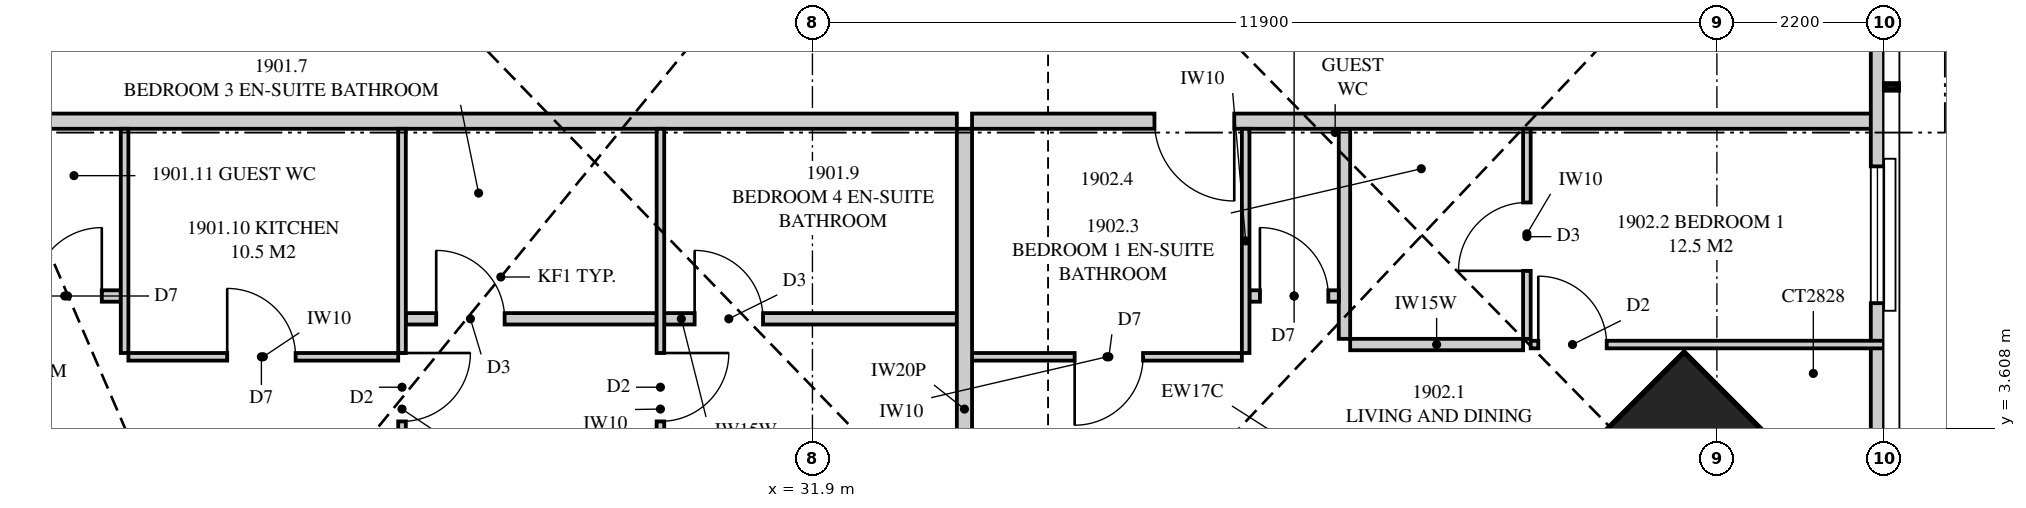
"""IFC4 building model, lengths in metres.
Left out: names, types, materials, properties, quantities, classifications, styles, units other than length and angle.
Written with IfcOpenShell. Run it as: python <this file> out.ifc"""

import sys

from ifc_helpers import new_model, si_unit, direction, frame, frame_2d, origin, origin_2d, place, context, subcontext, project, spatial, polyline, rectangle, hollow_rectangle, outline, extrude, element, fill, save


model = new_model("IFC4")
c1 = context("Model", 3, precision=1e-05, world=origin(), true_north=direction((0.0, 1.0)))
c2 = subcontext(c1, "Body", "Model", "MODEL_VIEW")
j1 = project(units=[si_unit("LENGTHUNIT", "METRE"), si_unit("PLANEANGLEUNIT", "RADIAN")], contexts=[c1])
p1 = place(None, origin())
s1 = spatial("IfcSite", under=j1, at=p1, CompositionType="ELEMENT")
p2 = place(p1, origin())
s2 = spatial("IfcBuilding", under=s1, at=p2, CompositionType="ELEMENT")
p3 = place(p2, frame((0.0, 0.0, 71.25)))
s3 = spatial("IfcBuildingStorey", under=s2, at=p3, CompositionType="ELEMENT", Elevation=71.25)
p4 = place(p3, frame((43.369, 2.631, 0.0), z_axis=(0.0, 0.0, 1.0), x_axis=(-0.707106781187, 0.707106781187, 0.0)))
e1 = element("IfcColumn", 1, at=p4, inside=s3, PredefinedType="COLUMN", context=c2, shape_type="SweptSolid", body=[
    extrude(hollow_rectangle(XDim=2.8, YDim=2.8, WallThickness=0.25, at=origin_2d()), origin(), (0.0, 0.0, 1.0), 3.5),
])
p5 = place(p3, frame((45.913, 3.051, 0.0), z_axis=(0.0, 0.0, 1.0), x_axis=(0.0, 1.0, 0.0)))
e2 = element("IfcWall", 2, at=p5, inside=s3, PredefinedType="SOLIDWALL", context=c2, shape_type="SweptSolid", body=[
    extrude(outline(polyline([(0.0, 0.0), (31.897, 0.0), (31.897, 3.22), (21.495, 3.22), (21.495, 2.256), (18.993, 3.22), (0.0, 3.22), (0.0, 0.0)])), frame((0.0, 0.087, 0.0), z_axis=(0.0, -1.0, 0.0), x_axis=(1.0, 0.0, 0.0)), (0.0, 0.0, 1.0), 0.175),
])
p6 = place(p5, frame((2.204, 0.0, 0.4)))
e3 = element("IfcOpeningElement", 3, at=p6, cuts=e2, PredefinedType="OPENING", context=c2, shape_type="SweptSolid", body=[
    extrude(rectangle(XDim=1.8, YDim=1.85, at=frame_2d((0.9, 0.925))), frame((0.0, 0.097, 0.0), z_axis=(0.0, -1.0, 0.0), x_axis=(1.0, 0.0, 0.0)), (0.0, 0.0, 1.0), 0.195),
])
p7 = place(p5, frame((14.849, 0.0, 0.4)))
e4 = element("IfcOpeningElement", 4, at=p7, cuts=e2, PredefinedType="OPENING", context=c2, shape_type="SweptSolid", body=[
    extrude(rectangle(XDim=1.2, YDim=1.85, at=frame_2d((0.6, 0.925))), frame((0.0, 0.097, 0.0), z_axis=(0.0, -1.0, 0.0), x_axis=(1.0, 0.0, 0.0)), (0.0, 0.0, 1.0), 0.195),
])
p8 = place(p5, frame((27.393, 0.0, 0.4)))
e5 = element("IfcOpeningElement", 5, at=p8, cuts=e2, PredefinedType="OPENING", context=c2, shape_type="SweptSolid", body=[
    extrude(rectangle(XDim=1.8, YDim=1.85, at=frame_2d((0.9, 0.925))), frame((0.0, 0.097, 0.0), z_axis=(0.0, -1.0, 0.0), x_axis=(1.0, 0.0, 0.0)), (0.0, 0.0, 1.0), 0.195),
])
p9 = place(p3, frame((33.9, 0.175, 0.0), z_axis=(0.0, 0.0, 1.0), x_axis=(0.0, 1.0, 0.0)))
e6 = element("IfcWall", 6, at=p9, inside=s3, PredefinedType="PARTITIONING", context=c2, shape_type="SweptSolid", body=[
    extrude(outline(polyline([(7.375, 0.0), (7.375, 3.22), (2.355, 3.22), (2.355, 2.641), (1.475, 2.641), (1.475, 2.1), (1.021, 2.1), (1.021, 1.499), (0.529, 1.499), (0.529, 2.1), (0.075, 2.1), (0.075, 3.22), (0.0, 3.22), (0.0, 0.0), (0.529, 0.0), (0.529, 0.802), (1.021, 0.802), (1.021, 0.0), (7.375, 0.0)])), frame((0.0, 0.1, 0.0), z_axis=(0.0, -1.0, 0.0), x_axis=(1.0, 0.0, 0.0)), (0.0, 0.0, 1.0), 0.2),
])
p10 = place(p3, frame((17.725, 7.65, 0.0), z_axis=(0.0, 0.0, 1.0), x_axis=(1.0, 0.0, 0.0)))
e7 = element("IfcWall", 7, at=p10, inside=s3, PredefinedType="PARTITIONING", context=c2, shape_type="SweptSolid", body=[
    extrude(outline(polyline([(0.0, 0.0), (16.075, 0.0), (16.075, 3.22), (12.137, 3.22), (12.137, 2.641), (11.364, 2.641), (11.364, 3.22), (11.217, 3.22), (11.217, 2.641), (10.366, 2.641), (10.366, 3.22), (6.564, 3.22), (6.564, 2.694), (5.986, 2.694), (5.986, 3.22), (3.693, 3.22), (3.693, 2.641), (2.439, 2.641), (2.439, 3.22), (0.689, 3.22), (0.689, 2.641), (0.0, 2.641), (0.0, 0.0)])), frame((0.0, 0.1, 0.0), z_axis=(0.0, -1.0, 0.0), x_axis=(1.0, 0.0, 0.0)), (0.0, 0.0, 1.0), 0.2),
])
p11 = place(p10, frame((0.2, 0.0, 0.0)))
e8 = element("IfcOpeningElement", 8, at=p11, cuts=e7, PredefinedType="OPENING", context=c2, shape_type="SweptSolid", body=[
    extrude(rectangle(XDim=1.05, YDim=2.2, at=frame_2d((0.525, 1.1))), frame((0.0, 0.11, 0.0), z_axis=(0.0, -1.0, 0.0), x_axis=(1.0, 0.0, 0.0)), (0.0, 0.0, 1.0), 0.22),
])
p12 = place(p3, frame((26.5, 0.175, 0.0), z_axis=(0.0, 0.0, 1.0), x_axis=(0.0, 1.0, 0.0)))
e9 = element("IfcWall", 9, at=p12, inside=s3, PredefinedType="PARTITIONING", context=c2, shape_type="SweptSolid", body=[
    extrude(outline(polyline([(0.0, 0.0), (7.375, 0.0), (7.375, 3.22), (4.269, 3.22), (4.269, 2.641), (3.4, 2.641), (3.4, 3.22), (1.485, 3.22), (1.485, 2.947), (1.475, 2.947), (1.475, 2.1), (0.075, 2.1), (0.075, 2.947), (0.0, 2.947), (0.0, 0.0)])), frame((0.0, 0.05, 0.0), z_axis=(0.0, -1.0, 0.0), x_axis=(1.0, 0.0, 0.0)), (0.0, 0.0, 1.0), 0.1),
])
p13 = place(p12, frame((3.525, 0.0, 0.0)))
e10 = element("IfcOpeningElement", 10, at=p13, cuts=e9, PredefinedType="OPENING", context=c2, shape_type="SweptSolid", body=[
    extrude(rectangle(XDim=0.9, YDim=2.1, at=frame_2d((0.45, 1.05))), frame((0.0, 0.06, 0.0), z_axis=(0.0, -1.0, 0.0), x_axis=(1.0, 0.0, 0.0)), (0.0, 0.0, 1.0), 0.12),
])
p14 = place(p3, frame((29.9, 0.175, 0.0), z_axis=(0.0, 0.0, 1.0), x_axis=(0.0, 1.0, 0.0)))
e11 = element("IfcWall", 11, at=p14, inside=s3, PredefinedType="PARTITIONING", context=c2, shape_type="SweptSolid", body=[
    extrude(outline(polyline([(0.0, 0.0), (7.375, 0.0), (7.375, 3.22), (6.436, 3.22), (6.436, 2.641), (5.654, 2.641), (5.654, 3.22), (1.475, 3.22), (1.475, 2.1), (0.075, 2.1), (0.075, 3.22), (0.0, 3.22), (0.0, 0.0)])), frame((0.0, 0.05, 0.0), z_axis=(0.0, -1.0, 0.0), x_axis=(1.0, 0.0, 0.0)), (0.0, 0.0, 1.0), 0.1),
])
p15 = place(p14, frame((3.525, 0.0, 0.0)))
e12 = element("IfcOpeningElement", 12, at=p15, cuts=e11, PredefinedType="OPENING", context=c2, shape_type="SweptSolid", body=[
    extrude(rectangle(XDim=0.9, YDim=2.1, at=frame_2d((0.45, 1.05))), frame((0.0, 0.06, 0.0), z_axis=(0.0, -1.0, 0.0), x_axis=(1.0, 0.0, 0.0)), (0.0, 0.0, 1.0), 0.12),
])
p16 = place(p3, frame((26.55, 5.05, 0.0), z_axis=(0.0, 0.0, 1.0), x_axis=(1.0, 0.0, 0.0)))
e13 = element("IfcWall", 13, at=p16, inside=s3, PredefinedType="PLUMBINGWALL", context=c2, shape_type="SweptSolid", body=[
    extrude(outline(polyline([(0.0, 0.0), (3.3, 0.0), (3.3, 3.22), (1.167, 3.22), (1.167, 2.641), (0.434, 2.641), (0.434, 3.22), (0.0, 3.22), (0.0, 0.0)])), frame((0.0, 0.075, 0.0), z_axis=(0.0, -1.0, 0.0), x_axis=(1.0, 0.0, 0.0)), (0.0, 0.0, 1.0), 0.15),
])
p17 = place(p16, frame((0.4, 0.0, 0.0)))
e14 = element("IfcOpeningElement", 14, at=p17, cuts=e13, PredefinedType="OPENING", context=c2, shape_type="SweptSolid", body=[
    extrude(rectangle(XDim=0.9, YDim=2.1, at=frame_2d((0.45, 1.05))), frame((0.0, 0.085, 0.0), z_axis=(0.0, -1.0, 0.0), x_axis=(1.0, 0.0, 0.0)), (0.0, 0.0, 1.0), 0.17),
])
p18 = place(p3, frame((29.95, 5.05, 0.0), z_axis=(0.0, 0.0, 1.0), x_axis=(1.0, 0.0, 0.0)))
e15 = element("IfcWall", 15, at=p18, inside=s3, PredefinedType="PLUMBINGWALL", context=c2, shape_type="SweptSolid", body=[
    extrude(outline(polyline([(0.0, 0.0), (3.85, 0.0), (3.85, 3.22), (1.483, 3.22), (1.483, 2.641), (0.681, 2.641), (0.681, 3.22), (0.0, 3.22), (0.0, 0.0)])), frame((0.0, 0.075, 0.0), z_axis=(0.0, -1.0, 0.0), x_axis=(1.0, 0.0, 0.0)), (0.0, 0.0, 1.0), 0.15),
])
p19 = place(p18, frame((0.4, 0.0, 0.0)))
e16 = element("IfcOpeningElement", 16, at=p19, cuts=e15, PredefinedType="OPENING", context=c2, shape_type="SweptSolid", body=[
    extrude(rectangle(XDim=0.9, YDim=2.1, at=frame_2d((0.45, 1.05))), frame((0.0, 0.085, 0.0), z_axis=(0.0, -1.0, 0.0), x_axis=(1.0, 0.0, 0.0)), (0.0, 0.0, 1.0), 0.17),
])
p20 = place(p3, frame((22.9, 4.55, 0.0), z_axis=(0.0, 0.0, 1.0), x_axis=(1.0, 0.0, 0.0)))
e17 = element("IfcWall", 17, at=p20, inside=s3, PredefinedType="PARTITIONING", context=c2, shape_type="SweptSolid", body=[
    extrude(outline(polyline([(0.0, 0.0), (3.55, 0.0), (3.55, 3.22), (1.389, 3.22), (1.389, 2.694), (0.811, 2.694), (0.811, 3.22), (0.0, 3.22), (0.0, 0.0)])), frame((0.0, 0.05, 0.0), z_axis=(0.0, -1.0, 0.0), x_axis=(1.0, 0.0, 0.0)), (0.0, 0.0, 1.0), 0.1),
])
p21 = place(p20, frame((1.3, 0.0, 0.0)))
e18 = element("IfcOpeningElement", 18, at=p21, cuts=e17, PredefinedType="OPENING", context=c2, shape_type="SweptSolid", body=[
    extrude(rectangle(XDim=0.9, YDim=2.1, at=frame_2d((0.45, 1.05))), frame((0.0, 0.06, 0.0), z_axis=(0.0, -1.0, 0.0), x_axis=(1.0, 0.0, 0.0)), (0.0, 0.0, 1.0), 0.12),
])
p22 = place(p3, frame((22.85, 4.6, 0.0), z_axis=(0.0, 0.0, 1.0), x_axis=(0.0, 1.0, 0.0)))
e19 = element("IfcWall", 19, at=p22, inside=s3, PredefinedType="PARTITIONING", context=c2, shape_type="SweptSolid", body=[
    extrude(rectangle(XDim=2.95, YDim=0.1, at=frame_2d((1.475, 0.0))), origin(), (0.0, 0.0, 1.0), 3.22),
])
p23 = place(p3, frame((21.325, 5.35, 0.0), z_axis=(0.0, 0.0, 1.0), x_axis=(1.0, 0.0, 0.0)))
e20 = element("IfcWall", 20, at=p23, inside=s3, PredefinedType="PLUMBINGWALL", context=c2, shape_type="SweptSolid", body=[
    extrude(outline(polyline([(0.0, 0.0), (1.475, 0.0), (1.475, 3.22), (1.072, 3.22), (1.072, 2.641), (0.493, 2.641), (0.493, 3.22), (0.0, 3.22), (0.0, 0.0)])), frame((0.0, 0.075, 0.0), z_axis=(0.0, -1.0, 0.0), x_axis=(1.0, 0.0, 0.0)), (0.0, 0.0, 1.0), 0.15),
])
p24 = place(p23, frame((0.325, 0.0, 0.0)))
e21 = element("IfcOpeningElement", 21, at=p24, cuts=e20, PredefinedType="OPENING", context=c2, shape_type="SweptSolid", body=[
    extrude(rectangle(XDim=0.9, YDim=2.1, at=frame_2d((0.45, 1.05))), frame((0.0, 0.085, 0.0), z_axis=(0.0, -1.0, 0.0), x_axis=(1.0, 0.0, 0.0)), (0.0, 0.0, 1.0), 0.17),
])
p25 = place(p3, frame((34.0, 7.65, 0.0), z_axis=(0.0, 0.0, 1.0), x_axis=(1.0, 0.0, 0.0)))
e22 = element("IfcWall", 22, at=p25, inside=s3, PredefinedType="PARTITIONING", context=c2, shape_type="SweptSolid", body=[
    extrude(outline(polyline([(0.0, 0.0), (12.0, 0.0), (12.0, 3.22), (10.908, 3.22), (10.908, 2.1), (9.457, 2.1), (9.457, 3.22), (7.76, 3.22), (7.76, 2.641), (6.92, 2.641), (6.92, 3.22), (4.878, 3.22), (4.878, 2.641), (4.02, 2.641), (4.02, 3.22), (1.349, 3.22), (1.349, 2.621), (0.651, 2.621), (0.651, 3.22), (0.0, 3.22), (0.0, 0.0)])), frame((0.0, 0.1, 0.0), z_axis=(0.0, -1.0, 0.0), x_axis=(1.0, 0.0, 0.0)), (0.0, 0.0, 1.0), 0.2),
])
p26 = place(p25, frame((2.4, 0.0, 0.0)))
e23 = element("IfcOpeningElement", 23, at=p26, cuts=e22, PredefinedType="OPENING", context=c2, shape_type="SweptSolid", body=[
    extrude(rectangle(XDim=1.05, YDim=2.2, at=frame_2d((0.525, 1.1))), frame((0.0, 0.11, 0.0), z_axis=(0.0, -1.0, 0.0), x_axis=(1.0, 0.0, 0.0)), (0.0, 0.0, 1.0), 0.22),
])
p27 = place(p3, frame((41.3, 4.786, 0.0), z_axis=(0.0, 0.0, 1.0), x_axis=(0.0, 1.0, 0.0)))
e24 = element("IfcWall", 24, at=p27, inside=s3, PredefinedType="PARTITIONING", context=c2, shape_type="SweptSolid", body=[
    extrude(outline(polyline([(0.0, 0.0), (2.764, 0.0), (2.764, 2.641), (2.425, 2.641), (2.425, 3.22), (0.344, 3.22), (0.344, 2.641), (0.0, 2.641), (0.0, 0.0)])), frame((0.0, 0.05, 0.0), z_axis=(0.0, -1.0, 0.0), x_axis=(1.0, 0.0, 0.0)), (0.0, 0.0, 1.0), 0.1),
])
p28 = place(p27, frame((0.894, 0.0, 0.0)))
e25 = element("IfcOpeningElement", 25, at=p28, cuts=e24, PredefinedType="OPENING", context=c2, shape_type="SweptSolid", body=[
    extrude(rectangle(XDim=0.9, YDim=2.1, at=frame_2d((0.45, 1.05))), frame((0.0, 0.06, 0.0), z_axis=(0.0, -1.0, 0.0), x_axis=(1.0, 0.0, 0.0)), (0.0, 0.0, 1.0), 0.12),
])
p29 = place(p3, frame((41.35, 4.711, 0.0), z_axis=(0.0, 0.0, 1.0), x_axis=(1.0, 0.0, 0.0)))
e26 = element("IfcWall", 26, at=p29, inside=s3, PredefinedType="PARTITIONING", context=c2, shape_type="SweptSolid", body=[
    extrude(outline(polyline([(0.0, 0.0), (4.65, 0.0), (4.65, 3.22), (3.471, 3.22), (3.471, 3.104), (3.433, 3.052), (3.073, 3.003), (3.073, 2.1), (1.639, 2.1), (1.639, 3.22), (0.359, 3.22), (0.359, 2.641), (0.0, 2.641), (0.0, 0.0)])), frame((0.0, 0.05, 0.0), z_axis=(0.0, -1.0, 0.0), x_axis=(1.0, 0.0, 0.0)), (0.0, 0.0, 1.0), 0.1),
])
p30 = place(p29, frame((0.1, 0.0, 0.0)))
e27 = element("IfcOpeningElement", 27, at=p30, cuts=e26, PredefinedType="OPENING", context=c2, shape_type="SweptSolid", body=[
    extrude(rectangle(XDim=0.9, YDim=2.1, at=frame_2d((0.45, 1.05))), frame((0.0, 0.06, 0.0), z_axis=(0.0, -1.0, 0.0), x_axis=(1.0, 0.0, 0.0)), (0.0, 0.0, 1.0), 0.12),
])
p31 = place(p3, frame((38.975, 4.711, 0.0), z_axis=(0.0, 0.0, 1.0), x_axis=(1.0, 0.0, 0.0)))
e28 = element("IfcWall", 28, at=p31, inside=s3, PredefinedType="PLUMBINGWALL", context=c2, shape_type="SweptSolid", body=[
    extrude(outline(polyline([(0.0, 0.0), (2.275, 0.0), (2.275, 2.641), (1.95, 2.641), (1.95, 3.22), (0.0, 3.22), (0.0, 0.0)])), frame((0.0, 0.075, 0.0), z_axis=(0.0, -1.0, 0.0), x_axis=(1.0, 0.0, 0.0)), (0.0, 0.0, 1.0), 0.15),
])
p32 = place(p3, frame((38.9, 4.786, 0.0), z_axis=(0.0, 0.0, 1.0), x_axis=(0.0, 1.0, 0.0)))
e29 = element("IfcWall", 29, at=p32, inside=s3, PredefinedType="PLUMBINGWALL", context=c2, shape_type="SweptSolid", body=[
    extrude(outline(polyline([(0.0, 0.0), (2.764, 0.0), (2.764, 2.641), (1.99, 2.641), (1.99, 3.22), (0.708, 3.22), (0.708, 2.641), (0.0, 2.641), (0.0, 0.0)])), frame((0.0, 0.075, 0.0), z_axis=(0.0, -1.0, 0.0), x_axis=(1.0, 0.0, 0.0)), (0.0, 0.0, 1.0), 0.15),
])
p33 = place(p3, frame((34.0, 4.55, 0.0), z_axis=(0.0, 0.0, 1.0), x_axis=(1.0, 0.0, 0.0)))
e30 = element("IfcWall", 30, at=p33, inside=s3, PredefinedType="PARTITIONING", context=c2, shape_type="SweptSolid", body=[
    extrude(outline(polyline([(0.0, 0.0), (3.55, 0.0), (3.55, 3.22), (1.299, 3.22), (1.299, 2.621), (0.701, 2.621), (0.701, 3.22), (0.0, 3.22), (0.0, 0.0)])), frame((0.0, 0.05, 0.0), z_axis=(0.0, -1.0, 0.0), x_axis=(1.0, 0.0, 0.0)), (0.0, 0.0, 1.0), 0.1),
])
p34 = place(p33, frame((1.35, 0.0, 0.0)))
e31 = element("IfcOpeningElement", 31, at=p34, cuts=e30, PredefinedType="OPENING", context=c2, shape_type="SweptSolid", body=[
    extrude(rectangle(XDim=0.9, YDim=2.1, at=frame_2d((0.45, 1.05))), frame((0.0, 0.06, 0.0), z_axis=(0.0, -1.0, 0.0), x_axis=(1.0, 0.0, 0.0)), (0.0, 0.0, 1.0), 0.12),
])
p35 = place(p3, frame((37.6, 4.6, 0.0), z_axis=(0.0, 0.0, 1.0), x_axis=(0.0, 1.0, 0.0)))
e32 = element("IfcWall", 32, at=p35, inside=s3, PredefinedType="PARTITIONING", context=c2, shape_type="SweptSolid", body=[
    extrude(rectangle(XDim=2.95, YDim=0.1, at=frame_2d((1.475, 0.0))), origin(), (0.0, 0.0, 1.0), 3.22),
])
p36 = place(p3, frame((37.65, 5.35, 0.0), z_axis=(0.0, 0.0, 1.0), x_axis=(1.0, 0.0, 0.0)))
e33 = element("IfcWall", 33, at=p36, inside=s3, PredefinedType="PLUMBINGWALL", context=c2, shape_type="SweptSolid", body=[
    extrude(outline(polyline([(0.0, 0.0), (1.175, 0.0), (1.175, 2.641), (1.117, 2.641), (1.117, 3.22), (0.0, 3.22), (0.0, 0.0)])), frame((0.0, 0.075, 0.0), z_axis=(0.0, -1.0, 0.0), x_axis=(1.0, 0.0, 0.0)), (0.0, 0.0, 1.0), 0.15),
])
p37 = place(p36, frame((0.137, 0.0, 0.0)))
e34 = element("IfcOpeningElement", 34, at=p37, cuts=e33, PredefinedType="OPENING", context=c2, shape_type="SweptSolid", body=[
    extrude(rectangle(XDim=0.9, YDim=2.1, at=frame_2d((0.45, 1.05))), frame((0.0, 0.085, 0.0), z_axis=(0.0, -1.0, 0.0), x_axis=(1.0, 0.0, 0.0)), (0.0, 0.0, 1.0), 0.17),
])
p38 = place(p6, origin())
e35 = element("IfcWindow", 35, at=p38, inside=s3, PartitioningType="SINGLE_PANEL", PredefinedType="WINDOW", context=c2, shape_type="SweptSolid", body=[
    extrude(rectangle(XDim=1.8, YDim=1.85, at=frame_2d((0.9, 0.925))), frame((0.0, 0.03, 0.0), z_axis=(0.0, -1.0, 0.0), x_axis=(1.0, 0.0, 0.0)), (0.0, 0.0, 1.0), 0.06),
])
fill(e3, e35)
p39 = place(p13, frame((0.9, 0.0, 0.0), z_axis=(0.0, 0.0, 1.0), x_axis=(-1.0, 0.0, 0.0)))
e36 = element("IfcDoor", 36, at=p39, inside=s3, OperationType="SINGLE_SWING_LEFT", PredefinedType="DOOR", context=c2, shape_type="SweptSolid", body=[
    extrude(rectangle(XDim=0.9, YDim=2.1, at=frame_2d((0.45, 1.05))), frame((0.0, 0.025, 0.0), z_axis=(0.0, -1.0, 0.0), x_axis=(1.0, 0.0, 0.0)), (0.0, 0.0, 1.0), 0.05),
])
fill(e10, e36)
p40 = place(p17, origin())
e37 = element("IfcDoor", 37, at=p40, inside=s3, OperationType="SINGLE_SWING_LEFT", PredefinedType="DOOR", context=c2, shape_type="SweptSolid", body=[
    extrude(rectangle(XDim=0.9, YDim=2.1, at=frame_2d((0.45, 1.05))), frame((0.0, 0.025, 0.0), z_axis=(0.0, -1.0, 0.0), x_axis=(1.0, 0.0, 0.0)), (0.0, 0.0, 1.0), 0.05),
])
fill(e14, e37)
p41 = place(p15, frame((0.9, 0.0, 0.0), z_axis=(0.0, 0.0, 1.0), x_axis=(-1.0, 0.0, 0.0)))
e38 = element("IfcDoor", 38, at=p41, inside=s3, OperationType="SINGLE_SWING_LEFT", PredefinedType="DOOR", context=c2, shape_type="SweptSolid", body=[
    extrude(rectangle(XDim=0.9, YDim=2.1, at=frame_2d((0.45, 1.05))), frame((0.0, 0.025, 0.0), z_axis=(0.0, -1.0, 0.0), x_axis=(1.0, 0.0, 0.0)), (0.0, 0.0, 1.0), 0.05),
])
fill(e12, e38)
p42 = place(p19, origin())
e39 = element("IfcDoor", 39, at=p42, inside=s3, OperationType="SINGLE_SWING_LEFT", PredefinedType="DOOR", context=c2, shape_type="SweptSolid", body=[
    extrude(rectangle(XDim=0.9, YDim=2.1, at=frame_2d((0.45, 1.05))), frame((0.0, 0.025, 0.0), z_axis=(0.0, -1.0, 0.0), x_axis=(1.0, 0.0, 0.0)), (0.0, 0.0, 1.0), 0.05),
])
fill(e16, e39)
p43 = place(p21, origin())
e40 = element("IfcDoor", 40, at=p43, inside=s3, OperationType="SINGLE_SWING_LEFT", PredefinedType="DOOR", context=c2, shape_type="SweptSolid", body=[
    extrude(rectangle(XDim=0.9, YDim=2.1, at=frame_2d((0.45, 1.05))), frame((0.0, 0.025, 0.0), z_axis=(0.0, -1.0, 0.0), x_axis=(1.0, 0.0, 0.0)), (0.0, 0.0, 1.0), 0.05),
])
fill(e18, e40)
p44 = place(p24, origin())
e41 = element("IfcDoor", 41, at=p44, inside=s3, OperationType="SINGLE_SWING_RIGHT", PredefinedType="DOOR", context=c2, shape_type="SweptSolid", body=[
    extrude(rectangle(XDim=0.9, YDim=2.1, at=frame_2d((0.45, 1.05))), frame((0.0, 0.025, 0.0), z_axis=(0.0, -1.0, 0.0), x_axis=(1.0, 0.0, 0.0)), (0.0, 0.0, 1.0), 0.05),
])
fill(e21, e41)
p45 = place(p26, frame((1.05, 0.0, 0.0), z_axis=(0.0, 0.0, 1.0), x_axis=(-1.0, 0.0, 0.0)))
e42 = element("IfcDoor", 42, at=p45, inside=s3, OperationType="SINGLE_SWING_LEFT", PredefinedType="DOOR", context=c2, shape_type="SweptSolid", body=[
    extrude(rectangle(XDim=1.05, YDim=2.2, at=frame_2d((0.525, 1.1))), frame((0.0, 0.025, 0.0), z_axis=(0.0, -1.0, 0.0), x_axis=(1.0, 0.0, 0.0)), (0.0, 0.0, 1.0), 0.05),
])
fill(e23, e42)
p46 = place(p30, origin())
e43 = element("IfcDoor", 43, at=p46, inside=s3, OperationType="SINGLE_SWING_LEFT", PredefinedType="DOOR", context=c2, shape_type="SweptSolid", body=[
    extrude(rectangle(XDim=0.9, YDim=2.1, at=frame_2d((0.45, 1.05))), frame((0.0, 0.025, 0.0), z_axis=(0.0, -1.0, 0.0), x_axis=(1.0, 0.0, 0.0)), (0.0, 0.0, 1.0), 0.05),
])
fill(e27, e43)
p47 = place(p28, origin())
e44 = element("IfcDoor", 44, at=p47, inside=s3, OperationType="SINGLE_SWING_LEFT", PredefinedType="DOOR", context=c2, shape_type="SweptSolid", body=[
    extrude(rectangle(XDim=0.9, YDim=2.1, at=frame_2d((0.45, 1.05))), frame((0.0, 0.025, 0.0), z_axis=(0.0, -1.0, 0.0), x_axis=(1.0, 0.0, 0.0)), (0.0, 0.0, 1.0), 0.05),
])
fill(e25, e44)
p48 = place(p34, frame((0.9, 0.0, 0.0), z_axis=(0.0, 0.0, 1.0), x_axis=(-1.0, 0.0, 0.0)))
e45 = element("IfcDoor", 45, at=p48, inside=s3, OperationType="SINGLE_SWING_RIGHT", PredefinedType="DOOR", context=c2, shape_type="SweptSolid", body=[
    extrude(rectangle(XDim=0.9, YDim=2.1, at=frame_2d((0.45, 1.05))), frame((0.0, 0.025, 0.0), z_axis=(0.0, -1.0, 0.0), x_axis=(1.0, 0.0, 0.0)), (0.0, 0.0, 1.0), 0.05),
])
fill(e31, e45)
p49 = place(p37, origin())
e46 = element("IfcDoor", 46, at=p49, inside=s3, OperationType="SINGLE_SWING_LEFT", PredefinedType="DOOR", context=c2, shape_type="SweptSolid", body=[
    extrude(rectangle(XDim=0.9, YDim=2.1, at=frame_2d((0.45, 1.05))), frame((0.0, 0.025, 0.0), z_axis=(0.0, -1.0, 0.0), x_axis=(1.0, 0.0, 0.0)), (0.0, 0.0, 1.0), 0.05),
])
fill(e34, e46)
save(model, sys.argv[1])
